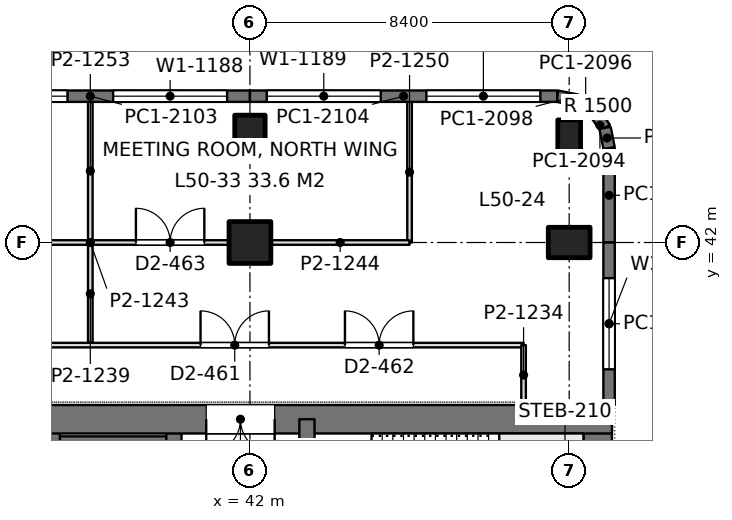
"""IFC4 building model, lengths in metres.
Left out: names, types, materials, properties, quantities, classifications, styles, units other than length and angle.
Written with IfcOpenShell. Run it as: python <this file> out.ifc"""

import sys

from ifc_helpers import new_model, si_unit, direction, frame, frame_2d, origin, origin_2d, place, context, subcontext, project, spatial, rectangle, extrude, element, fill, save


model = new_model("IFC4")
c1 = context("Model", 3, precision=1e-05, world=origin(), true_north=direction((0.0, 1.0)))
c2 = subcontext(c1, "Body", "Model", "MODEL_VIEW")
j1 = project(units=[si_unit("LENGTHUNIT", "METRE"), si_unit("PLANEANGLEUNIT", "RADIAN")], contexts=[c1])
p1 = place(None, origin())
s1 = spatial("IfcSite", under=j1, at=p1, CompositionType="ELEMENT")
p2 = place(p1, origin())
s2 = spatial("IfcBuilding", under=s1, at=p2, CompositionType="ELEMENT")
p3 = place(p2, frame((0.0, 0.0, 219.6)))
s3 = spatial("IfcBuildingStorey", under=s2, at=p3, CompositionType="ELEMENT", Elevation=219.6)
p4 = place(p3, frame((42.0, 42.0, 0.0), z_axis=(0.0, 0.0, 1.0), x_axis=(1.0, 0.0, 0.0)))
e1 = element("IfcColumn", 1, at=p4, inside=s3, PredefinedType="COLUMN", context=c2, shape_type="SweptSolid", body=[
    extrude(rectangle(XDim=1.1, YDim=1.1, at=origin_2d()), origin(), (0.0, 0.0, 1.0), 4.2),
])
for number, where, z_axis, x_axis in (
    (2, (42.0, 44.8, 0.0), (0.0, 0.0, 1.0), (1.0, 0.0, 0.0)),
    (3, (50.4, 42.0, 0.0), (0.0, 0.0, 1.0), (0.0, 1.0, 0.0)),
):
    element("IfcColumn", number, at=place(p3, frame(where, z_axis=z_axis, x_axis=x_axis)), inside=s3, PredefinedType="COLUMN", context=c2, shape_type="SweptSolid", body=[
        extrude(rectangle(XDim=0.8, YDim=1.1, at=origin_2d()), origin(), (0.0, 0.0, 1.0), 4.2),
    ])
p5 = place(p3, frame((50.4, 44.8, 0.0), z_axis=(0.0, 0.0, 1.0), x_axis=(1.0, 0.0, 0.0)))
e4 = element("IfcColumn", 4, at=p5, inside=s3, PredefinedType="COLUMN", context=c2, shape_type="SweptSolid", body=[
    extrude(rectangle(XDim=0.6, YDim=0.85, at=origin_2d()), origin(), (0.0, 0.0, 1.0), 4.2),
])
p6 = place(p3, frame((33.675, 37.35, 0.0), z_axis=(0.0, 0.0, 1.0), x_axis=(1.0, 0.0, 0.0)))
e5 = element("IfcWall", 5, at=p6, inside=s3, PredefinedType="SHEAR", context=c2, shape_type="SweptSolid", body=[
    extrude(rectangle(XDim=17.85, YDim=0.75, at=frame_2d((8.925, 0.0))), origin(), (0.0, 0.0, 1.0), 4.2),
])
p7 = place(p6, frame((7.175, 0.0, 0.0)))
e6 = element("IfcOpeningElement", 6, at=p7, cuts=e5, PredefinedType="OPENING", context=c2, shape_type="SweptSolid", body=[
    extrude(rectangle(XDim=1.8, YDim=2.4, at=frame_2d((0.9, 1.2))), frame((0.0, 0.385, 0.0), z_axis=(0.0, -1.0, 0.0), x_axis=(1.0, 0.0, 0.0)), (0.0, 0.0, 1.0), 0.77),
])
p8 = place(p3, frame((51.15, 13.05, 0.0), z_axis=(0.0, 0.0, 1.0), x_axis=(0.0, 1.0, 0.0)))
e7 = element("IfcWall", 7, at=p8, inside=s3, PredefinedType="SHEAR", context=c2, shape_type="SweptSolid", body=[
    extrude(rectangle(XDim=24.3, YDim=0.75, at=frame_2d((12.15, 0.0))), origin(), (0.0, 0.0, 1.0), 4.2),
])
p9 = place(p3, frame((43.5, 13.05, 0.0), z_axis=(0.0, 0.0, 1.0), x_axis=(0.0, 1.0, 0.0)))
e8 = element("IfcWall", 8, at=p9, inside=s3, PredefinedType="SHEAR", context=c2, shape_type="SweptSolid", body=[
    extrude(rectangle(XDim=24.3, YDim=0.4, at=frame_2d((12.15, 0.0))), origin(), (0.0, 0.0, 1.0), 4.2),
])
p10 = place(p9, frame((1.3, 0.0, 0.0)))
e9 = element("IfcOpeningElement", 9, at=p10, cuts=e8, PredefinedType="OPENING", context=c2, shape_type="SweptSolid", body=[
    extrude(rectangle(XDim=1.0, YDim=2.2, at=frame_2d((0.5, 1.1))), frame((0.0, 0.21, 0.0), z_axis=(0.0, -1.0, 0.0), x_axis=(1.0, 0.0, 0.0)), (0.0, 0.0, 1.0), 0.42),
])
p11 = place(p9, frame((22.0, 0.0, 0.0)))
e10 = element("IfcOpeningElement", 10, at=p11, cuts=e8, PredefinedType="OPENING", context=c2, shape_type="SweptSolid", body=[
    extrude(rectangle(XDim=1.0, YDim=2.2, at=frame_2d((0.5, 1.1))), frame((0.0, 0.21, 0.0), z_axis=(0.0, -1.0, 0.0), x_axis=(1.0, 0.0, 0.0)), (0.0, 0.0, 1.0), 0.42),
])
p12 = place(p9, frame((5.55, 0.0, 0.0)))
e11 = element("IfcOpeningElement", 11, at=p12, cuts=e8, PredefinedType="OPENING", context=c2, shape_type="SweptSolid", body=[
    extrude(rectangle(XDim=1.0, YDim=2.2, at=frame_2d((0.5, 1.1))), frame((0.0, 0.21, 0.0), z_axis=(0.0, -1.0, 0.0), x_axis=(1.0, 0.0, 0.0)), (0.0, 0.0, 1.0), 0.42),
])
p13 = place(p9, frame((9.55, 0.0, 0.0)))
e12 = element("IfcOpeningElement", 12, at=p13, cuts=e8, PredefinedType="OPENING", context=c2, shape_type="SweptSolid", body=[
    extrude(rectangle(XDim=1.0, YDim=2.2, at=frame_2d((0.5, 1.1))), frame((0.0, 0.21, 0.0), z_axis=(0.0, -1.0, 0.0), x_axis=(1.0, 0.0, 0.0)), (0.0, 0.0, 1.0), 0.42),
])
p14 = place(p9, frame((12.8, 0.0, 0.0)))
e13 = element("IfcOpeningElement", 13, at=p14, cuts=e8, PredefinedType="OPENING", context=c2, shape_type="SweptSolid", body=[
    extrude(rectangle(XDim=1.1, YDim=2.2, at=frame_2d((0.55, 1.1))), frame((0.0, 0.21, 0.0), z_axis=(0.0, -1.0, 0.0), x_axis=(1.0, 0.0, 0.0)), (0.0, 0.0, 1.0), 0.42),
])
p15 = place(p9, frame((15.538, 0.0, 0.0)))
e14 = element("IfcOpeningElement", 14, at=p15, cuts=e8, PredefinedType="OPENING", context=c2, shape_type="SweptSolid", body=[
    extrude(rectangle(XDim=1.1, YDim=2.2, at=frame_2d((0.55, 1.1))), frame((0.0, 0.21, 0.0), z_axis=(0.0, -1.0, 0.0), x_axis=(1.0, 0.0, 0.0)), (0.0, 0.0, 1.0), 0.42),
])
p16 = place(p9, frame((18.262, 0.0, 0.0)))
e15 = element("IfcOpeningElement", 15, at=p16, cuts=e8, PredefinedType="OPENING", context=c2, shape_type="SweptSolid", body=[
    extrude(rectangle(XDim=1.1, YDim=2.2, at=frame_2d((0.55, 1.1))), frame((0.0, 0.21, 0.0), z_axis=(0.0, -1.0, 0.0), x_axis=(1.0, 0.0, 0.0)), (0.0, 0.0, 1.0), 0.42),
])
p17 = place(p3, frame((40.0, 13.05, 0.0), z_axis=(0.0, 0.0, 1.0), x_axis=(0.0, 1.0, 0.0)))
e16 = element("IfcWall", 16, at=p17, inside=s3, PredefinedType="SHEAR", context=c2, shape_type="SweptSolid", body=[
    extrude(rectangle(XDim=24.3, YDim=0.4, at=frame_2d((12.15, 0.0))), origin(), (0.0, 0.0, 1.0), 4.2),
])
p18 = place(p17, frame((15.75, 0.0, 0.0)))
e17 = element("IfcOpeningElement", 17, at=p18, cuts=e16, PredefinedType="OPENING", context=c2, shape_type="SweptSolid", body=[
    extrude(rectangle(XDim=1.1, YDim=2.2, at=frame_2d((0.55, 1.1))), frame((0.0, 0.21, 0.0), z_axis=(0.0, -1.0, 0.0), x_axis=(1.0, 0.0, 0.0)), (0.0, 0.0, 1.0), 0.42),
])
p19 = place(p17, frame((18.6, 0.0, 0.0)))
e18 = element("IfcOpeningElement", 18, at=p19, cuts=e16, PredefinedType="OPENING", context=c2, shape_type="SweptSolid", body=[
    extrude(rectangle(XDim=1.1, YDim=2.2, at=frame_2d((0.55, 1.1))), frame((0.0, 0.21, 0.0), z_axis=(0.0, -1.0, 0.0), x_axis=(1.0, 0.0, 0.0)), (0.0, 0.0, 1.0), 0.42),
])
p20 = place(p17, frame((21.45, 0.0, 0.0)))
e19 = element("IfcOpeningElement", 19, at=p20, cuts=e16, PredefinedType="OPENING", context=c2, shape_type="SweptSolid", body=[
    extrude(rectangle(XDim=1.1, YDim=2.2, at=frame_2d((0.55, 1.1))), frame((0.0, 0.21, 0.0), z_axis=(0.0, -1.0, 0.0), x_axis=(1.0, 0.0, 0.0)), (0.0, 0.0, 1.0), 0.42),
])
p21 = place(p17, frame((8.65, 0.0, 0.0)))
e20 = element("IfcOpeningElement", 20, at=p21, cuts=e16, PredefinedType="OPENING", context=c2, shape_type="SweptSolid", body=[
    extrude(rectangle(XDim=1.8, YDim=2.4, at=frame_2d((0.9, 1.2))), frame((0.0, 0.21, 0.0), z_axis=(0.0, -1.0, 0.0), x_axis=(1.0, 0.0, 0.0)), (0.0, 0.0, 1.0), 0.42),
])
p22 = place(p3, frame((36.8, 27.925, 0.0), z_axis=(0.0, 0.0, 1.0), x_axis=(0.0, 1.0, 0.0)))
e21 = element("IfcWall", 21, at=p22, inside=s3, PredefinedType="SHEAR", context=c2, shape_type="SweptSolid", body=[
    extrude(rectangle(XDim=9.425, YDim=0.4, at=frame_2d((4.712, 0.0))), origin(), (0.0, 0.0, 1.0), 4.2),
])
p23 = place(p3, frame((40.0, 36.625, 0.0), z_axis=(0.0, 0.0, 1.0), x_axis=(-1.0, 0.0, 0.0)))
e22 = element("IfcWall", 22, at=p23, inside=s3, PredefinedType="SHEAR", context=c2, shape_type="SweptSolid", body=[
    extrude(rectangle(XDim=3.2, YDim=0.55, at=frame_2d((1.6, 0.0))), origin(), (0.0, 0.0, 1.0), 4.2),
])
p24 = place(p3, frame((33.6, 45.85, 0.0), z_axis=(0.0, 0.0, 1.0), x_axis=(1.0, 0.0, 0.0)))
e23 = element("IfcWall", 23, at=p24, inside=s3, PredefinedType="SOLIDWALL", context=c2, shape_type="SweptSolid", body=[
    extrude(rectangle(XDim=8.4, YDim=0.3, at=frame_2d((4.2, 0.0))), origin(), (0.0, 0.0, 1.0), 4.05),
])
p25 = place(p24, frame((0.6, 0.0, 0.9)))
e24 = element("IfcOpeningElement", 24, at=p25, cuts=e23, PredefinedType="OPENING", context=c2, shape_type="SweptSolid", body=[
    extrude(rectangle(XDim=3.0, YDim=1.9, at=frame_2d((1.5, 0.95))), frame((0.0, 0.16, 0.0), z_axis=(0.0, -1.0, 0.0), x_axis=(1.0, 0.0, 0.0)), (0.0, 0.0, 1.0), 0.32),
])
p26 = place(p24, frame((4.8, 0.0, 0.9)))
e25 = element("IfcOpeningElement", 25, at=p26, cuts=e23, PredefinedType="OPENING", context=c2, shape_type="SweptSolid", body=[
    extrude(rectangle(XDim=3.0, YDim=1.9, at=frame_2d((1.5, 0.95))), frame((0.0, 0.16, 0.0), z_axis=(0.0, -1.0, 0.0), x_axis=(1.0, 0.0, 0.0)), (0.0, 0.0, 1.0), 0.32),
])
p27 = place(p3, frame((42.0, 45.85, 0.0), z_axis=(0.0, 0.0, 1.0), x_axis=(1.0, 0.0, 0.0)))
e26 = element("IfcWall", 26, at=p27, inside=s3, PredefinedType="SOLIDWALL", context=c2, shape_type="SweptSolid", body=[
    extrude(rectangle(XDim=8.085, YDim=0.3, at=frame_2d((4.042, 0.0))), origin(), (0.0, 0.0, 1.0), 4.05),
])
p28 = place(p27, frame((0.443, 0.0, 0.9)))
e27 = element("IfcOpeningElement", 27, at=p28, cuts=e26, PredefinedType="OPENING", context=c2, shape_type="SweptSolid", body=[
    extrude(rectangle(XDim=3.0, YDim=1.9, at=frame_2d((1.5, 0.95))), frame((0.0, 0.16, 0.0), z_axis=(0.0, -1.0, 0.0), x_axis=(1.0, 0.0, 0.0)), (0.0, 0.0, 1.0), 0.32),
])
p29 = place(p27, frame((4.643, 0.0, 0.9)))
e28 = element("IfcOpeningElement", 28, at=p29, cuts=e26, PredefinedType="OPENING", context=c2, shape_type="SweptSolid", body=[
    extrude(rectangle(XDim=3.0, YDim=1.9, at=frame_2d((1.5, 0.95))), frame((0.0, 0.16, 0.0), z_axis=(0.0, -1.0, 0.0), x_axis=(1.0, 0.0, 0.0)), (0.0, 0.0, 1.0), 0.32),
])
p30 = place(p3, frame((50.085, 45.85, 0.0), z_axis=(0.0, 0.0, 1.0), x_axis=(0.980702050465, -0.1955082817, 0.0)))
e29 = element("IfcWall", 29, at=p30, inside=s3, PredefinedType="SOLIDWALL", context=c2, shape_type="SweptSolid", body=[
    extrude(rectangle(XDim=0.541, YDim=0.3, at=frame_2d((0.271, 0.0))), origin(), (0.0, 0.0, 1.0), 4.05),
])
p31 = place(p3, frame((50.615, 45.744, 0.0), z_axis=(0.0, 0.0, 1.0), x_axis=(0.831692711774, -0.555236195849, 0.0)))
e30 = element("IfcWall", 30, at=p31, inside=s3, PredefinedType="SOLIDWALL", context=c2, shape_type="SweptSolid", body=[
    extrude(rectangle(XDim=0.525, YDim=0.3, at=frame_2d((0.263, 0.0))), origin(), (0.0, 0.0, 1.0), 4.05),
])
p32 = place(p3, frame((51.052, 45.453, 0.0), z_axis=(0.0, 0.0, 1.0), x_axis=(0.55534295404, -0.831621430339, 0.0)))
e31 = element("IfcWall", 31, at=p32, inside=s3, PredefinedType="SOLIDWALL", context=c2, shape_type="SweptSolid", body=[
    extrude(rectangle(XDim=0.526, YDim=0.3, at=frame_2d((0.263, 0.0))), origin(), (0.0, 0.0, 1.0), 4.05),
])
p33 = place(p3, frame((51.344, 45.015, 0.0), z_axis=(0.0, 0.0, 1.0), x_axis=(0.195073962632, -0.980788534345, 0.0)))
e32 = element("IfcWall", 32, at=p33, inside=s3, PredefinedType="SOLIDWALL", context=c2, shape_type="SweptSolid", body=[
    extrude(rectangle(XDim=0.541, YDim=0.3, at=frame_2d((0.271, 0.0))), origin(), (0.0, 0.0, 1.0), 4.05),
])
p34 = place(p3, frame((51.45, 44.485, 0.0), z_axis=(0.0, 0.0, 1.0), x_axis=(0.0, -1.0, 0.0)))
e33 = element("IfcWall", 33, at=p34, inside=s3, PredefinedType="SOLIDWALL", context=c2, shape_type="SweptSolid", body=[
    extrude(rectangle(XDim=2.485, YDim=0.3, at=frame_2d((1.243, 0.0))), origin(), (0.0, 0.0, 1.0), 4.05),
])
p35 = place(p3, frame((51.45, 42.0, 0.0), z_axis=(0.0, 0.0, 1.0), x_axis=(0.0, -1.0, 0.0)))
e34 = element("IfcWall", 34, at=p35, inside=s3, PredefinedType="SOLIDWALL", context=c2, shape_type="SweptSolid", body=[
    extrude(rectangle(XDim=4.275, YDim=0.3, at=frame_2d((2.137, 0.0))), origin(), (0.0, 0.0, 1.0), 4.05),
])
p36 = place(p35, frame((0.938, 0.0, 0.9)))
e35 = element("IfcOpeningElement", 35, at=p36, cuts=e34, PredefinedType="OPENING", context=c2, shape_type="SweptSolid", body=[
    extrude(rectangle(XDim=2.4, YDim=1.9, at=frame_2d((1.2, 0.95))), frame((0.0, 0.16, 0.0), z_axis=(0.0, -1.0, 0.0), x_axis=(1.0, 0.0, 0.0)), (0.0, 0.0, 1.0), 0.32),
])
p37 = place(p3, frame((34.149, 42.0, 0.0), z_axis=(0.0, 0.0, 1.0), x_axis=(1.0, 0.0, 0.0)))
e36 = element("IfcWall", 36, at=p37, inside=s3, PredefinedType="PARTITIONING", context=c2, shape_type="SweptSolid", body=[
    extrude(rectangle(XDim=7.302, YDim=0.12, at=frame_2d((3.651, 0.0))), origin(), (0.0, 0.0, 1.0), 3.55),
])
p38 = place(p37, frame((1.051, 0.0, 0.0)))
e37 = element("IfcOpeningElement", 37, at=p38, cuts=e36, PredefinedType="OPENING", context=c2, shape_type="SweptSolid", body=[
    extrude(rectangle(XDim=1.0, YDim=2.4, at=frame_2d((0.5, 1.2))), frame((0.0, 0.07, 0.0), z_axis=(0.0, -1.0, 0.0), x_axis=(1.0, 0.0, 0.0)), (0.0, 0.0, 1.0), 0.14),
])
p39 = place(p37, frame((4.851, 0.0, 0.0)))
e38 = element("IfcOpeningElement", 38, at=p39, cuts=e36, PredefinedType="OPENING", context=c2, shape_type="SweptSolid", body=[
    extrude(rectangle(XDim=1.8, YDim=2.2, at=frame_2d((0.9, 1.1))), frame((0.0, 0.07, 0.0), z_axis=(0.0, -1.0, 0.0), x_axis=(1.0, 0.0, 0.0)), (0.0, 0.0, 1.0), 0.14),
])
p40 = place(p3, frame((42.549, 42.0, 0.0), z_axis=(0.0, 0.0, 1.0), x_axis=(1.0, 0.0, 0.0)))
e39 = element("IfcWall", 39, at=p40, inside=s3, PredefinedType="PARTITIONING", context=c2, shape_type="SweptSolid", body=[
    extrude(rectangle(XDim=3.651, YDim=0.12, at=frame_2d((1.825, 0.0))), origin(), (0.0, 0.0, 1.0), 3.55),
])
p41 = place(p3, frame((37.8, 42.058, 0.0), z_axis=(0.0, 0.0, 1.0), x_axis=(0.0, 1.0, 0.0)))
e40 = element("IfcWall", 40, at=p41, inside=s3, PredefinedType="PARTITIONING", context=c2, shape_type="SweptSolid", body=[
    extrude(rectangle(XDim=3.644, YDim=0.12, at=frame_2d((1.822, 0.0))), origin(), (0.0, 0.0, 1.0), 3.55),
])
p42 = place(p3, frame((46.2, 42.0, 0.0), z_axis=(0.0, 0.0, 1.0), x_axis=(0.0, 1.0, 0.0)))
e41 = element("IfcWall", 41, at=p42, inside=s3, PredefinedType="PARTITIONING", context=c2, shape_type="SweptSolid", body=[
    extrude(rectangle(XDim=3.702, YDim=0.12, at=frame_2d((1.851, 0.0))), origin(), (0.0, 0.0, 1.0), 3.55),
])
p43 = place(p3, frame((37.8, 39.358, 0.0), z_axis=(0.0, 0.0, 1.0), x_axis=(0.0, 1.0, 0.0)))
e42 = element("IfcWall", 42, at=p43, inside=s3, PredefinedType="PARTITIONING", context=c2, shape_type="SweptSolid", body=[
    extrude(rectangle(XDim=2.584, YDim=0.12, at=frame_2d((1.292, 0.0))), origin(), (0.0, 0.0, 1.0), 3.55),
])
p44 = place(p3, frame((7.748, 39.3, 0.0), z_axis=(0.0, 0.0, 1.0), x_axis=(1.0, 0.0, 0.0)))
e43 = element("IfcWall", 43, at=p44, inside=s3, PredefinedType="PARTITIONING", context=c2, shape_type="SweptSolid", body=[
    extrude(rectangle(XDim=41.452, YDim=0.12, at=frame_2d((20.726, 0.0))), origin(), (0.0, 0.0, 1.0), 3.55),
])
p45 = place(p44, frame((1.527, 0.0, 0.0)))
e44 = element("IfcOpeningElement", 44, at=p45, cuts=e43, PredefinedType="OPENING", context=c2, shape_type="SweptSolid", body=[
    extrude(rectangle(XDim=1.8, YDim=2.2, at=frame_2d((0.9, 1.1))), frame((0.0, 0.07, 0.0), z_axis=(0.0, -1.0, 0.0), x_axis=(1.0, 0.0, 0.0)), (0.0, 0.0, 1.0), 0.14),
])
p46 = place(p44, frame((8.152, 0.0, 0.0)))
e45 = element("IfcOpeningElement", 45, at=p46, cuts=e43, PredefinedType="OPENING", context=c2, shape_type="SweptSolid", body=[
    extrude(rectangle(XDim=1.8, YDim=2.2, at=frame_2d((0.9, 1.1))), frame((0.0, 0.07, 0.0), z_axis=(0.0, -1.0, 0.0), x_axis=(1.0, 0.0, 0.0)), (0.0, 0.0, 1.0), 0.14),
])
p47 = place(p44, frame((12.352, 0.0, 0.0)))
e46 = element("IfcOpeningElement", 46, at=p47, cuts=e43, PredefinedType="OPENING", context=c2, shape_type="SweptSolid", body=[
    extrude(rectangle(XDim=1.8, YDim=2.2, at=frame_2d((0.9, 1.1))), frame((0.0, 0.07, 0.0), z_axis=(0.0, -1.0, 0.0), x_axis=(1.0, 0.0, 0.0)), (0.0, 0.0, 1.0), 0.14),
])
p48 = place(p44, frame((20.752, 0.0, 0.0)))
e47 = element("IfcOpeningElement", 47, at=p48, cuts=e43, PredefinedType="OPENING", context=c2, shape_type="SweptSolid", body=[
    extrude(rectangle(XDim=1.8, YDim=2.2, at=frame_2d((0.9, 1.1))), frame((0.0, 0.07, 0.0), z_axis=(0.0, -1.0, 0.0), x_axis=(1.0, 0.0, 0.0)), (0.0, 0.0, 1.0), 0.14),
])
p49 = place(p44, frame((24.952, 0.0, 0.0)))
e48 = element("IfcOpeningElement", 48, at=p49, cuts=e43, PredefinedType="OPENING", context=c2, shape_type="SweptSolid", body=[
    extrude(rectangle(XDim=1.8, YDim=2.2, at=frame_2d((0.9, 1.1))), frame((0.0, 0.07, 0.0), z_axis=(0.0, -1.0, 0.0), x_axis=(1.0, 0.0, 0.0)), (0.0, 0.0, 1.0), 0.14),
])
p50 = place(p44, frame((32.952, 0.0, 0.0)))
e49 = element("IfcOpeningElement", 49, at=p50, cuts=e43, PredefinedType="OPENING", context=c2, shape_type="SweptSolid", body=[
    extrude(rectangle(XDim=1.8, YDim=2.2, at=frame_2d((0.9, 1.1))), frame((0.0, 0.07, 0.0), z_axis=(0.0, -1.0, 0.0), x_axis=(1.0, 0.0, 0.0)), (0.0, 0.0, 1.0), 0.14),
])
p51 = place(p44, frame((36.752, 0.0, 0.0)))
e50 = element("IfcOpeningElement", 50, at=p51, cuts=e43, PredefinedType="OPENING", context=c2, shape_type="SweptSolid", body=[
    extrude(rectangle(XDim=1.8, YDim=2.2, at=frame_2d((0.9, 1.1))), frame((0.0, 0.07, 0.0), z_axis=(0.0, -1.0, 0.0), x_axis=(1.0, 0.0, 0.0)), (0.0, 0.0, 1.0), 0.14),
])
p52 = place(p3, frame((49.2, 37.724, 0.0), z_axis=(0.0, 0.0, 1.0), x_axis=(0.0, 1.0, 0.0)))
e51 = element("IfcWall", 51, at=p52, inside=s3, PredefinedType="PARTITIONING", context=c2, shape_type="SweptSolid", body=[
    extrude(rectangle(XDim=1.576, YDim=0.12, at=frame_2d((0.788, 0.0))), origin(), (0.0, 0.0, 1.0), 4.05),
])
p53 = place(p25, origin())
e52 = element("IfcWindow", 52, at=p53, inside=s3, PartitioningType="SINGLE_PANEL", PredefinedType="WINDOW", context=c2, shape_type="SweptSolid", body=[
    extrude(rectangle(XDim=3.0, YDim=1.9, at=frame_2d((1.5, 0.95))), frame((0.0, 0.03, 0.0), z_axis=(0.0, -1.0, 0.0), x_axis=(1.0, 0.0, 0.0)), (0.0, 0.0, 1.0), 0.06),
])
fill(e24, e52)
p54 = place(p26, origin())
e53 = element("IfcWindow", 53, at=p54, inside=s3, PartitioningType="SINGLE_PANEL", PredefinedType="WINDOW", context=c2, shape_type="SweptSolid", body=[
    extrude(rectangle(XDim=3.0, YDim=1.9, at=frame_2d((1.5, 0.95))), frame((0.0, 0.03, 0.0), z_axis=(0.0, -1.0, 0.0), x_axis=(1.0, 0.0, 0.0)), (0.0, 0.0, 1.0), 0.06),
])
fill(e25, e53)
p55 = place(p28, origin())
e54 = element("IfcWindow", 54, at=p55, inside=s3, PartitioningType="SINGLE_PANEL", PredefinedType="WINDOW", context=c2, shape_type="SweptSolid", body=[
    extrude(rectangle(XDim=3.0, YDim=1.9, at=frame_2d((1.5, 0.95))), frame((0.0, 0.03, 0.0), z_axis=(0.0, -1.0, 0.0), x_axis=(1.0, 0.0, 0.0)), (0.0, 0.0, 1.0), 0.06),
])
fill(e27, e54)
p56 = place(p29, origin())
e55 = element("IfcWindow", 55, at=p56, inside=s3, PartitioningType="SINGLE_PANEL", PredefinedType="WINDOW", context=c2, shape_type="SweptSolid", body=[
    extrude(rectangle(XDim=3.0, YDim=1.9, at=frame_2d((1.5, 0.95))), frame((0.0, 0.03, 0.0), z_axis=(0.0, -1.0, 0.0), x_axis=(1.0, 0.0, 0.0)), (0.0, 0.0, 1.0), 0.06),
])
fill(e28, e55)
p57 = place(p36, origin())
e56 = element("IfcWindow", 56, at=p57, inside=s3, PartitioningType="SINGLE_PANEL", PredefinedType="WINDOW", context=c2, shape_type="SweptSolid", body=[
    extrude(rectangle(XDim=2.4, YDim=1.9, at=frame_2d((1.2, 0.95))), frame((0.0, 0.03, 0.0), z_axis=(0.0, -1.0, 0.0), x_axis=(1.0, 0.0, 0.0)), (0.0, 0.0, 1.0), 0.06),
])
fill(e35, e56)
p58 = place(p7, frame((1.8, 0.0, 0.0), z_axis=(0.0, 0.0, 1.0), x_axis=(-1.0, 0.0, 0.0)))
e57 = element("IfcDoor", 57, at=p58, inside=s3, OperationType="DOUBLE_DOOR_SINGLE_SWING", PredefinedType="DOOR", context=c2, shape_type="SweptSolid", body=[
    extrude(rectangle(XDim=1.8, YDim=2.4, at=frame_2d((0.9, 1.2))), frame((0.0, 0.025, 0.0), z_axis=(0.0, -1.0, 0.0), x_axis=(1.0, 0.0, 0.0)), (0.0, 0.0, 1.0), 0.05),
])
fill(e6, e57)
p59 = place(p39, origin())
e58 = element("IfcDoor", 58, at=p59, inside=s3, OperationType="DOUBLE_DOOR_SINGLE_SWING", PredefinedType="DOOR", context=c2, shape_type="SweptSolid", body=[
    extrude(rectangle(XDim=1.8, YDim=2.2, at=frame_2d((0.9, 1.1))), frame((0.0, 0.025, 0.0), z_axis=(0.0, -1.0, 0.0), x_axis=(1.0, 0.0, 0.0)), (0.0, 0.0, 1.0), 0.05),
])
fill(e38, e58)
p60 = place(p50, origin())
e59 = element("IfcDoor", 59, at=p60, inside=s3, OperationType="DOUBLE_DOOR_SINGLE_SWING", PredefinedType="DOOR", context=c2, shape_type="SweptSolid", body=[
    extrude(rectangle(XDim=1.8, YDim=2.2, at=frame_2d((0.9, 1.1))), frame((0.0, 0.025, 0.0), z_axis=(0.0, -1.0, 0.0), x_axis=(1.0, 0.0, 0.0)), (0.0, 0.0, 1.0), 0.05),
])
fill(e49, e59)
p61 = place(p51, origin())
e60 = element("IfcDoor", 60, at=p61, inside=s3, OperationType="DOUBLE_DOOR_SINGLE_SWING", PredefinedType="DOOR", context=c2, shape_type="SweptSolid", body=[
    extrude(rectangle(XDim=1.8, YDim=2.2, at=frame_2d((0.9, 1.1))), frame((0.0, 0.025, 0.0), z_axis=(0.0, -1.0, 0.0), x_axis=(1.0, 0.0, 0.0)), (0.0, 0.0, 1.0), 0.05),
])
fill(e50, e60)
save(model, sys.argv[1])
